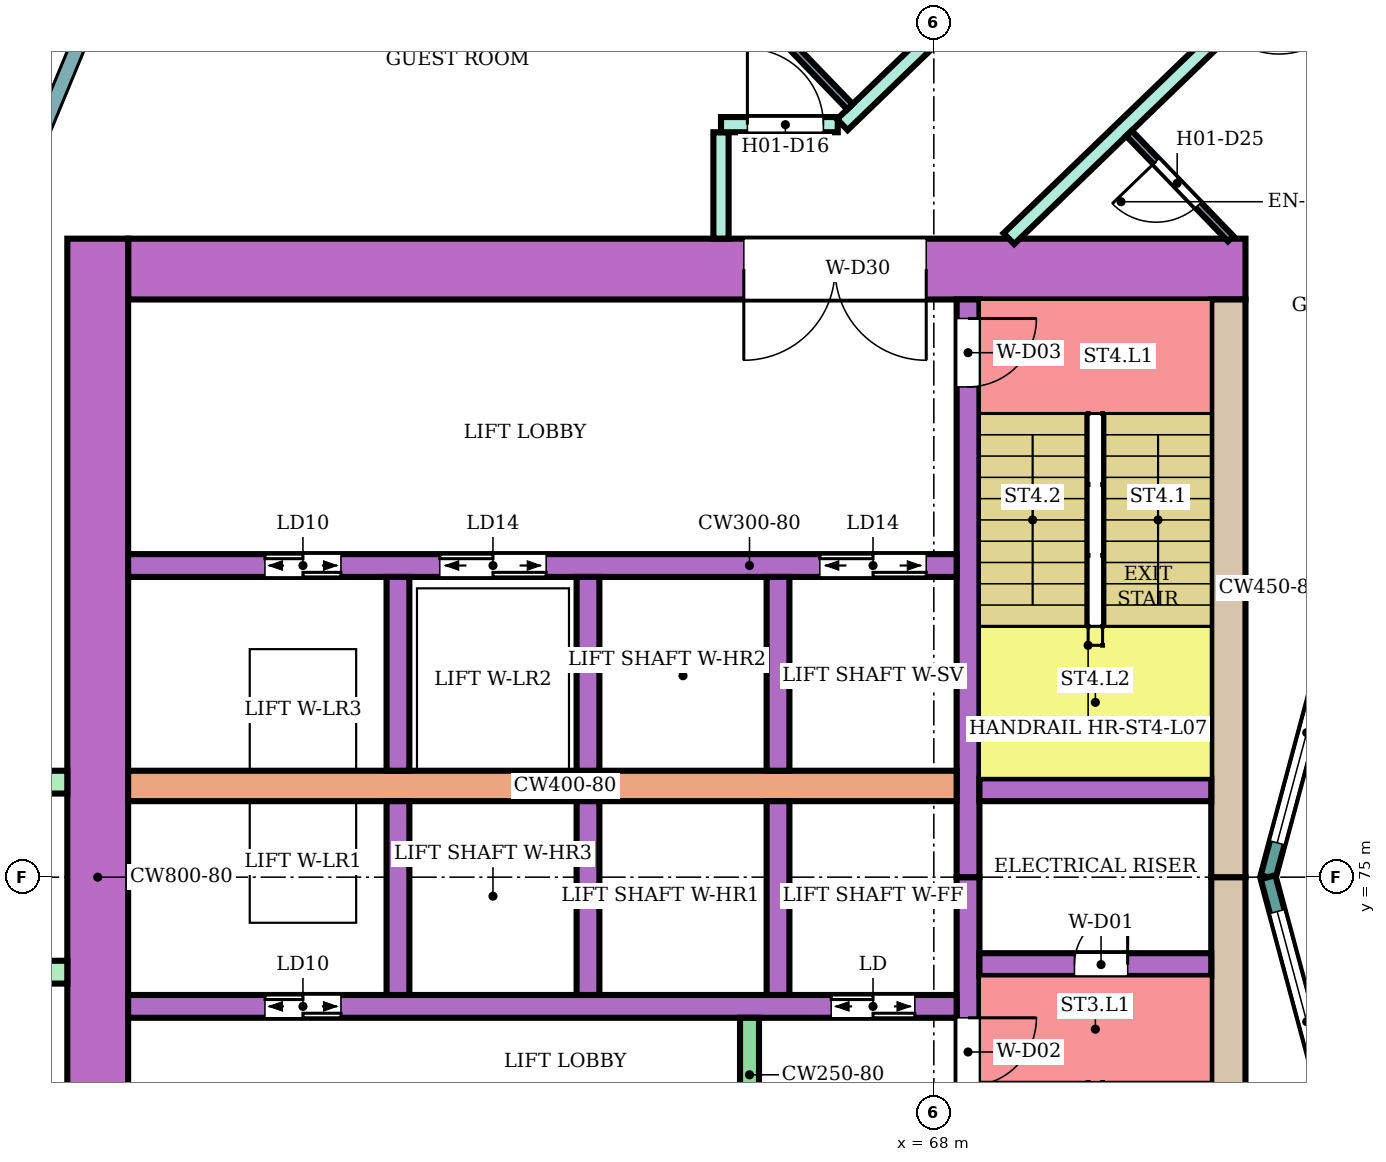
"""IFC4 building model, lengths in metres.
Left out: names, types, materials, properties, quantities, classifications, styles, units other than length and angle.
Written with IfcOpenShell. Run it as: python <this file> out.ifc"""

import sys

from ifc_helpers import new_model, si_unit, direction, frame, frame_2d, origin, place, context, subcontext, project, spatial, rectangle, extrude, element, fill, save


model = new_model("IFC4")
c1 = context("Model", 3, precision=1e-05, world=origin(), true_north=direction((0.0, 1.0)))
c2 = subcontext(c1, "Body", "Model", "MODEL_VIEW")
j1 = project(units=[si_unit("LENGTHUNIT", "METRE"), si_unit("PLANEANGLEUNIT", "RADIAN")], contexts=[c1])
p1 = place(None, origin())
s1 = spatial("IfcSite", under=j1, at=p1, CompositionType="ELEMENT")
p2 = place(p1, origin())
s2 = spatial("IfcBuilding", under=s1, at=p2, CompositionType="ELEMENT")
p3 = place(p2, frame((0.0, 0.0, 36.4)))
s3 = spatial("IfcBuildingStorey", under=s2, at=p3, CompositionType="ELEMENT", Elevation=36.4)
p4 = place(p3, frame((72.1, 83.0, 0.0), z_axis=(0.0, 0.0, 1.0), x_axis=(-1.0, 0.0, 0.0)))
e1 = element("IfcWall", 1, at=p4, inside=s3, PredefinedType="SHEAR", context=c2, shape_type="SweptSolid", body=[
    extrude(rectangle(XDim=14.7, YDim=0.8, at=frame_2d((7.35, 0.0))), origin(), (0.0, 0.0, 1.0), 3.48),
])
p5 = place(p4, frame((4.2, 0.0, 0.0)))
e2 = element("IfcOpeningElement", 2, at=p5, cuts=e1, PredefinedType="OPENING", context=c2, shape_type="SweptSolid", body=[
    extrude(rectangle(XDim=2.4, YDim=2.4, at=frame_2d((1.2, 1.2))), frame((0.0, 0.41, 0.0), z_axis=(0.0, -1.0, 0.0), x_axis=(1.0, 0.0, 0.0)), (0.0, 0.0, 1.0), 0.82),
])
for number, where, z_axis, x_axis in (
    (3, (71.875, 75.0, 0.0), (0.0, 0.0, 1.0), (0.0, -1.0, 0.0)),
    (4, (71.875, 82.6, 0.0), (0.0, 0.0, 1.0), (0.0, -1.0, 0.0)),
):
    element("IfcWall", number, at=place(p3, frame(where, z_axis=z_axis, x_axis=x_axis)), inside=s3, PredefinedType="SHEAR", context=c2, shape_type="SweptSolid", body=[
        extrude(rectangle(XDim=7.6, YDim=0.45, at=frame_2d((3.8, 0.0))), origin(), (0.0, 0.0, 1.0), 3.48),
    ])
p6 = place(p3, frame((57.0, 83.4, 0.0), z_axis=(0.0, 0.0, 1.0), x_axis=(0.0, -1.0, 0.0)))
e5 = element("IfcWall", 5, at=p6, inside=s3, PredefinedType="SHEAR", context=c2, shape_type="SweptSolid", body=[
    extrude(rectangle(XDim=16.8, YDim=0.8, at=frame_2d((8.4, 0.0))), origin(), (0.0, 0.0, 1.0), 3.48),
])
p7 = place(p3, frame((68.45, 75.0, 0.0), z_axis=(0.0, 0.0, 1.0), x_axis=(0.0, -1.0, 0.0)))
e6 = element("IfcWall", 6, at=p7, inside=s3, PredefinedType="SHEAR", context=c2, shape_type="SweptSolid", body=[
    extrude(rectangle(XDim=7.6, YDim=0.3, at=frame_2d((3.8, 0.0))), origin(), (0.0, 0.0, 1.0), 3.48),
])
p8 = place(p7, frame((1.85, 0.0, 0.0)))
e7 = element("IfcOpeningElement", 7, at=p8, cuts=e6, PredefinedType="OPENING", context=c2, shape_type="SweptSolid", body=[
    extrude(rectangle(XDim=0.9, YDim=2.1, at=frame_2d((0.45, 1.05))), frame((0.0, 0.16, 0.0), z_axis=(0.0, -1.0, 0.0), x_axis=(1.0, 0.0, 0.0)), (0.0, 0.0, 1.0), 0.32),
])
p9 = place(p3, frame((68.45, 82.6, 0.0), z_axis=(0.0, 0.0, 1.0), x_axis=(0.0, -1.0, 0.0)))
e8 = element("IfcWall", 8, at=p9, inside=s3, PredefinedType="SHEAR", context=c2, shape_type="SweptSolid", body=[
    extrude(rectangle(XDim=7.6, YDim=0.3, at=frame_2d((3.8, 0.0))), origin(), (0.0, 0.0, 1.0), 3.48),
])
p10 = place(p9, frame((0.25, 0.0, 0.0)))
e9 = element("IfcOpeningElement", 9, at=p10, cuts=e8, PredefinedType="OPENING", context=c2, shape_type="SweptSolid", body=[
    extrude(rectangle(XDim=0.9, YDim=2.1, at=frame_2d((0.45, 1.05))), frame((0.0, 0.16, 0.0), z_axis=(0.0, -1.0, 0.0), x_axis=(1.0, 0.0, 0.0)), (0.0, 0.0, 1.0), 0.32),
])
p11 = place(p3, frame((71.65, 73.85, 0.0), z_axis=(0.0, 0.0, 1.0), x_axis=(-1.0, 0.0, 0.0)))
e10 = element("IfcWall", 10, at=p11, inside=s3, PredefinedType="SHEAR", context=c2, shape_type="SweptSolid", body=[
    extrude(rectangle(XDim=3.05, YDim=0.3, at=frame_2d((1.525, 0.0))), origin(), (0.0, 0.0, 1.0), 3.48),
])
p12 = place(p11, frame((1.1, 0.0, 0.0)))
e11 = element("IfcOpeningElement", 11, at=p12, cuts=e10, PredefinedType="OPENING", context=c2, shape_type="SweptSolid", body=[
    extrude(rectangle(XDim=0.7, YDim=2.0, at=frame_2d((0.35, 1.0))), frame((0.0, 0.16, 0.0), z_axis=(0.0, -1.0, 0.0), x_axis=(1.0, 0.0, 0.0)), (0.0, 0.0, 1.0), 0.32),
])
p13 = place(p3, frame((71.65, 76.15, 0.0), z_axis=(0.0, 0.0, 1.0), x_axis=(-1.0, 0.0, 0.0)))
e12 = element("IfcWall", 12, at=p13, inside=s3, PredefinedType="SHEAR", context=c2, shape_type="SweptSolid", body=[
    extrude(rectangle(XDim=3.05, YDim=0.3, at=frame_2d((1.525, 0.0))), origin(), (0.0, 0.0, 1.0), 3.48),
])
p14 = place(p3, frame((68.3, 73.3, 0.0), z_axis=(0.0, 0.0, 1.0), x_axis=(-1.0, 0.0, 0.0)))
e13 = element("IfcWall", 13, at=p14, inside=s3, PredefinedType="SHEAR", context=c2, shape_type="SweptSolid", body=[
    extrude(rectangle(XDim=10.9, YDim=0.3, at=frame_2d((5.45, 0.0))), origin(), (0.0, 0.0, 1.0), 3.48),
])
p15 = place(p14, frame((0.55, 0.0, 0.0)))
e14 = element("IfcOpeningElement", 14, at=p15, cuts=e13, PredefinedType="OPENING", context=c2, shape_type="SweptSolid", body=[
    extrude(rectangle(XDim=1.1, YDim=2.1, at=frame_2d((0.55, 1.05))), frame((0.0, 0.16, 0.0), z_axis=(0.0, -1.0, 0.0), x_axis=(1.0, 0.0, 0.0)), (0.0, 0.0, 1.0), 0.32),
])
p16 = place(p14, frame((8.1, 0.0, 0.0)))
e15 = element("IfcOpeningElement", 15, at=p16, cuts=e13, PredefinedType="OPENING", context=c2, shape_type="SweptSolid", body=[
    extrude(rectangle(XDim=1.0, YDim=2.1, at=frame_2d((0.5, 1.05))), frame((0.0, 0.16, 0.0), z_axis=(0.0, -1.0, 0.0), x_axis=(1.0, 0.0, 0.0)), (0.0, 0.0, 1.0), 0.32),
])
p17 = place(p3, frame((68.3, 76.2, 0.0), z_axis=(0.0, 0.0, 1.0), x_axis=(-1.0, 0.0, 0.0)))
e16 = element("IfcWall", 16, at=p17, inside=s3, PredefinedType="SHEAR", context=c2, shape_type="SweptSolid", body=[
    extrude(rectangle(XDim=10.9, YDim=0.4, at=frame_2d((5.45, 0.0))), origin(), (0.0, 0.0, 1.0), 3.48),
])
p18 = place(p3, frame((68.3, 79.1, 0.0), z_axis=(0.0, 0.0, 1.0), x_axis=(-1.0, 0.0, 0.0)))
e17 = element("IfcWall", 17, at=p18, inside=s3, PredefinedType="SHEAR", context=c2, shape_type="SweptSolid", body=[
    extrude(rectangle(XDim=10.9, YDim=0.3, at=frame_2d((5.45, 0.0))), origin(), (0.0, 0.0, 1.0), 3.48),
])
p19 = place(p18, frame((0.4, 0.0, 0.0)))
e18 = element("IfcOpeningElement", 18, at=p19, cuts=e17, PredefinedType="OPENING", context=c2, shape_type="SweptSolid", body=[
    extrude(rectangle(XDim=1.4, YDim=2.1, at=frame_2d((0.7, 1.05))), frame((0.0, 0.16, 0.0), z_axis=(0.0, -1.0, 0.0), x_axis=(1.0, 0.0, 0.0)), (0.0, 0.0, 1.0), 0.32),
])
p20 = place(p18, frame((5.4, 0.0, 0.0)))
e19 = element("IfcOpeningElement", 19, at=p20, cuts=e17, PredefinedType="OPENING", context=c2, shape_type="SweptSolid", body=[
    extrude(rectangle(XDim=1.4, YDim=2.1, at=frame_2d((0.7, 1.05))), frame((0.0, 0.16, 0.0), z_axis=(0.0, -1.0, 0.0), x_axis=(1.0, 0.0, 0.0)), (0.0, 0.0, 1.0), 0.32),
])
p21 = place(p18, frame((8.1, 0.0, 0.0)))
e20 = element("IfcOpeningElement", 20, at=p21, cuts=e17, PredefinedType="OPENING", context=c2, shape_type="SweptSolid", body=[
    extrude(rectangle(XDim=1.0, YDim=2.1, at=frame_2d((0.5, 1.05))), frame((0.0, 0.16, 0.0), z_axis=(0.0, -1.0, 0.0), x_axis=(1.0, 0.0, 0.0)), (0.0, 0.0, 1.0), 0.32),
])
for number, where, z_axis, x_axis in (
    (21, (65.95, 76.0, 0.0), (0.0, 0.0, 1.0), (0.0, -1.0, 0.0)),
    (22, (63.45, 76.0, 0.0), (0.0, 0.0, 1.0), (0.0, -1.0, 0.0)),
    (23, (60.95, 76.0, 0.0), (0.0, 0.0, 1.0), (0.0, -1.0, 0.0)),
    (24, (65.95, 78.95, 0.0), (0.0, 0.0, 1.0), (0.0, -1.0, 0.0)),
    (25, (63.45, 78.95, 0.0), (0.0, 0.0, 1.0), (0.0, -1.0, 0.0)),
    (26, (60.95, 78.95, 0.0), (0.0, 0.0, 1.0), (0.0, -1.0, 0.0)),
):
    element("IfcWall", number, at=place(p3, frame(where, z_axis=z_axis, x_axis=x_axis)), inside=s3, PredefinedType="SHEAR", context=c2, shape_type="SweptSolid", body=[
        extrude(rectangle(XDim=2.55, YDim=0.3, at=frame_2d((1.275, 0.0))), origin(), (0.0, 0.0, 1.0), 3.48),
    ])
p22 = place(p3, frame((65.575, 73.15, 0.0), z_axis=(0.0, 0.0, 1.0), x_axis=(0.0, -1.0, 0.0)))
e27 = element("IfcWall", 27, at=p22, inside=s3, PredefinedType="SHEAR", context=c2, shape_type="SweptSolid", body=[
    extrude(rectangle(XDim=1.5, YDim=0.25, at=frame_2d((0.75, 0.0))), origin(), (0.0, 0.0, 1.0), 3.48),
])
for number, where, z_axis, x_axis in (
    (28, (56.6, 76.25, 0.0), (0.0, 0.0, 1.0), (-1.0, 0.0, 0.0)),
    (29, (56.6, 73.75, 0.0), (0.0, 0.0, 1.0), (-1.0, 0.0, 0.0)),
):
    element("IfcWall", number, at=place(p3, frame(where, z_axis=z_axis, x_axis=x_axis)), inside=s3, PredefinedType="NOTDEFINED", context=c2, shape_type="SweptSolid", body=[
        extrude(rectangle(XDim=2.416, YDim=0.3, at=frame_2d((1.208, 0.0))), origin(), (0.0, 0.0, 1.0), 3.8),
    ])
p23 = place(p3, frame((73.415, 78.802, 0.0), z_axis=(0.0, 0.0, 1.0), x_axis=(-0.258789828301, -0.965933654434, 0.0)))
e30 = element("IfcWall", 30, at=p23, inside=s3, PredefinedType="NOTDEFINED", context=c2, shape_type="SweptSolid", body=[
    extrude(rectangle(XDim=3.936, YDim=0.2, at=frame_2d((1.968, 0.0))), origin(), (0.0, 0.0, 1.0), 3.8),
])
p24 = place(p23, frame((0.468, 0.0, 0.9)))
e31 = element("IfcOpeningElement", 31, at=p24, cuts=e30, PredefinedType="OPENING", context=c2, shape_type="SweptSolid", body=[
    extrude(rectangle(XDim=3.0, YDim=2.3, at=frame_2d((1.5, 1.15))), frame((0.0, 0.11, 0.0), z_axis=(0.0, -1.0, 0.0), x_axis=(1.0, 0.0, 0.0)), (0.0, 0.0, 1.0), 0.22),
])
p25 = place(p3, frame((72.396, 75.0, 0.0), z_axis=(0.0, 0.0, 1.0), x_axis=(0.258789828301, -0.965933654434, 0.0)))
e32 = element("IfcWall", 32, at=p25, inside=s3, PredefinedType="NOTDEFINED", context=c2, shape_type="SweptSolid", body=[
    extrude(rectangle(XDim=3.936, YDim=0.2, at=frame_2d((1.968, 0.0))), origin(), (0.0, 0.0, 1.0), 3.8),
])
p26 = place(p25, frame((0.468, 0.0, 0.9)))
e33 = element("IfcOpeningElement", 33, at=p26, cuts=e32, PredefinedType="OPENING", context=c2, shape_type="SweptSolid", body=[
    extrude(rectangle(XDim=3.0, YDim=2.3, at=frame_2d((1.5, 1.15))), frame((0.0, 0.11, 0.0), z_axis=(0.0, -1.0, 0.0), x_axis=(1.0, 0.0, 0.0)), (0.0, 0.0, 1.0), 0.22),
])
p27 = place(p3, frame((65.2, 83.401, 0.0), z_axis=(0.0, 0.0, 1.0), x_axis=(0.0, 1.0, 0.0)))
e34 = element("IfcWall", 34, at=p27, inside=s3, PredefinedType="PARTITIONING", context=c2, shape_type="SweptSolid", body=[
    extrude(rectangle(XDim=1.399, YDim=0.2, at=frame_2d((0.7, 0.0))), origin(), (0.0, 0.0, 1.0), 3.35),
])
p28 = place(p3, frame((65.2, 84.9, 0.0), z_axis=(0.0, 0.0, 1.0), x_axis=(1.0, 0.0, 0.0)))
e35 = element("IfcWall", 35, at=p28, inside=s3, PredefinedType="PARTITIONING", context=c2, shape_type="SweptSolid", body=[
    extrude(rectangle(XDim=1.536, YDim=0.2, at=frame_2d((0.768, 0.0))), origin(), (0.0, 0.0, 1.0), 3.35),
])
p29 = place(p28, frame((0.347, 0.0, 0.0)))
e36 = element("IfcOpeningElement", 36, at=p29, cuts=e35, PredefinedType="OPENING", context=c2, shape_type="SweptSolid", body=[
    extrude(rectangle(XDim=1.0, YDim=2.1, at=frame_2d((0.5, 1.05))), frame((0.0, 0.11, 0.0), z_axis=(0.0, -1.0, 0.0), x_axis=(1.0, 0.0, 0.0)), (0.0, 0.0, 1.0), 0.22),
])
p30 = place(p3, frame((66.796, 84.9, 0.0), z_axis=(0.0, 0.0, 1.0), x_axis=(0.719690131178, 0.694295409092, 0.0)))
e37 = element("IfcWall", 37, at=p30, inside=s3, PredefinedType="PARTITIONING", context=c2, shape_type="SweptSolid", body=[
    extrude(rectangle(XDim=6.585, YDim=0.2, at=frame_2d((3.293, 0.0))), origin(), (0.0, 0.0, 1.0), 3.35),
])
p31 = place(p30, frame((2.867, 0.0, 0.0)))
e38 = element("IfcOpeningElement", 38, at=p31, cuts=e37, PredefinedType="OPENING", context=c2, shape_type="SweptSolid", body=[
    extrude(rectangle(XDim=1.0, YDim=2.1, at=frame_2d((0.5, 1.05))), frame((0.0, 0.11, 0.0), z_axis=(0.0, -1.0, 0.0), x_axis=(1.0, 0.0, 0.0)), (0.0, 0.0, 1.0), 0.22),
])
p32 = place(p3, frame((68.987, 83.4, 0.0), z_axis=(0.0, 0.0, 1.0), x_axis=(0.719591503389, 0.694397629784, 0.0)))
e39 = element("IfcWall", 39, at=p32, inside=s3, PredefinedType="PARTITIONING", context=c2, shape_type="SweptSolid", body=[
    extrude(rectangle(XDim=5.378, YDim=0.2, at=frame_2d((2.689, 0.0))), origin(), (0.0, 0.0, 1.0), 3.35),
])
p33 = place(p32, frame((3.938, 0.0, 0.0)))
e40 = element("IfcOpeningElement", 40, at=p33, cuts=e39, PredefinedType="OPENING", context=c2, shape_type="SweptSolid", body=[
    extrude(rectangle(XDim=1.0, YDim=2.1, at=frame_2d((0.5, 1.05))), frame((0.0, 0.11, 0.0), z_axis=(0.0, -1.0, 0.0), x_axis=(1.0, 0.0, 0.0)), (0.0, 0.0, 1.0), 0.22),
])
p34 = place(p3, frame((72.948, 87.214, 0.0), z_axis=(0.0, 0.0, 1.0), x_axis=(0.499943524694, -0.866058007363, 0.0)))
e41 = element("IfcWall", 41, at=p34, inside=s3, PredefinedType="PARTITIONING", context=c2, shape_type="SweptSolid", body=[
    extrude(rectangle(XDim=6.405, YDim=0.2, at=frame_2d((3.203, 0.0))), origin(), (0.0, 0.0, 1.0), 3.35),
])
p35 = place(p3, frame((65.022, 87.079, 0.0), z_axis=(0.0, 0.0, 1.0), x_axis=(0.694287838235, -0.719697434815, 0.0)))
e42 = element("IfcWall", 42, at=p35, inside=s3, PredefinedType="PARTITIONING", context=c2, shape_type="SweptSolid", body=[
    extrude(rectangle(XDim=2.7, YDim=0.1, at=frame_2d((1.35, 0.0))), origin(), (0.0, 0.0, 1.0), 3.35),
])
p36 = place(p35, frame((0.85, 0.0, 0.0)))
e43 = element("IfcOpeningElement", 43, at=p36, cuts=e42, PredefinedType="OPENING", context=c2, shape_type="SweptSolid", body=[
    extrude(rectangle(XDim=0.8, YDim=2.1, at=frame_2d((0.4, 1.05))), frame((0.0, 0.06, 0.0), z_axis=(0.0, -1.0, 0.0), x_axis=(1.0, 0.0, 0.0)), (0.0, 0.0, 1.0), 0.12),
])
p37 = place(p3, frame((70.567, 84.786, 0.0), z_axis=(0.0, 0.0, 1.0), x_axis=(0.694447472534, -0.719543402368, 0.0)))
e44 = element("IfcWall", 44, at=p37, inside=s3, PredefinedType="PARTITIONING", context=c2, shape_type="SweptSolid", body=[
    extrude(rectangle(XDim=1.926, YDim=0.1, at=frame_2d((0.963, 0.0))), origin(), (0.0, 0.0, 1.0), 3.35),
])
p38 = place(p37, frame((0.513, 0.0, 0.0)))
e45 = element("IfcOpeningElement", 45, at=p38, cuts=e44, PredefinedType="OPENING", context=c2, shape_type="SweptSolid", body=[
    extrude(rectangle(XDim=0.8, YDim=2.1, at=frame_2d((0.4, 1.05))), frame((0.0, 0.06, 0.0), z_axis=(0.0, -1.0, 0.0), x_axis=(1.0, 0.0, 0.0)), (0.0, 0.0, 1.0), 0.12),
])
p39 = place(p24, origin())
e46 = element("IfcWindow", 46, at=p39, inside=s3, PartitioningType="SINGLE_PANEL", PredefinedType="WINDOW", context=c2, shape_type="SweptSolid", body=[
    extrude(rectangle(XDim=3.0, YDim=2.3, at=frame_2d((1.5, 1.15))), frame((0.0, 0.03, 0.0), z_axis=(0.0, -1.0, 0.0), x_axis=(1.0, 0.0, 0.0)), (0.0, 0.0, 1.0), 0.06),
])
fill(e31, e46)
p40 = place(p26, origin())
e47 = element("IfcWindow", 47, at=p40, inside=s3, PartitioningType="SINGLE_PANEL", PredefinedType="WINDOW", context=c2, shape_type="SweptSolid", body=[
    extrude(rectangle(XDim=3.0, YDim=2.3, at=frame_2d((1.5, 1.15))), frame((0.0, 0.03, 0.0), z_axis=(0.0, -1.0, 0.0), x_axis=(1.0, 0.0, 0.0)), (0.0, 0.0, 1.0), 0.06),
])
fill(e33, e47)
p41 = place(p29, origin())
e48 = element("IfcDoor", 48, at=p41, inside=s3, OperationType="SINGLE_SWING_LEFT", PredefinedType="DOOR", context=c2, shape_type="SweptSolid", body=[
    extrude(rectangle(XDim=1.0, YDim=2.1, at=frame_2d((0.5, 1.05))), frame((0.0, 0.025, 0.0), z_axis=(0.0, -1.0, 0.0), x_axis=(1.0, 0.0, 0.0)), (0.0, 0.0, 1.0), 0.05),
])
fill(e36, e48)
p42 = place(p38, frame((0.8, 0.0, 0.0), z_axis=(0.0, 0.0, 1.0), x_axis=(-1.0, 0.0, 0.0)))
e49 = element("IfcDoor", 49, at=p42, inside=s3, OperationType="SINGLE_SWING_RIGHT", PredefinedType="DOOR", context=c2, shape_type="SweptSolid", body=[
    extrude(rectangle(XDim=0.8, YDim=2.1, at=frame_2d((0.4, 1.05))), frame((0.0, 0.025, 0.0), z_axis=(0.0, -1.0, 0.0), x_axis=(1.0, 0.0, 0.0)), (0.0, 0.0, 1.0), 0.05),
])
fill(e45, e49)
p43 = place(p12, frame((0.7, 0.0, 0.0), z_axis=(0.0, 0.0, 1.0), x_axis=(-1.0, 0.0, 0.0)))
e50 = element("IfcDoor", 50, at=p43, inside=s3, OperationType="SINGLE_SWING_RIGHT", PredefinedType="DOOR", context=c2, shape_type="SweptSolid", body=[
    extrude(rectangle(XDim=0.7, YDim=2.0, at=frame_2d((0.35, 1.0))), frame((0.0, 0.025, 0.0), z_axis=(0.0, -1.0, 0.0), x_axis=(1.0, 0.0, 0.0)), (0.0, 0.0, 1.0), 0.05),
])
fill(e11, e50)
p44 = place(p8, origin())
e51 = element("IfcDoor", 51, at=p44, inside=s3, OperationType="SINGLE_SWING_LEFT", PredefinedType="DOOR", context=c2, shape_type="SweptSolid", body=[
    extrude(rectangle(XDim=0.9, YDim=2.1, at=frame_2d((0.45, 1.05))), frame((0.0, 0.025, 0.0), z_axis=(0.0, -1.0, 0.0), x_axis=(1.0, 0.0, 0.0)), (0.0, 0.0, 1.0), 0.05),
])
fill(e7, e51)
p45 = place(p10, origin())
e52 = element("IfcDoor", 52, at=p45, inside=s3, OperationType="SINGLE_SWING_LEFT", PredefinedType="DOOR", context=c2, shape_type="SweptSolid", body=[
    extrude(rectangle(XDim=0.9, YDim=2.1, at=frame_2d((0.45, 1.05))), frame((0.0, 0.025, 0.0), z_axis=(0.0, -1.0, 0.0), x_axis=(1.0, 0.0, 0.0)), (0.0, 0.0, 1.0), 0.05),
])
fill(e9, e52)
p46 = place(p15, origin())
e53 = element("IfcDoor", 53, at=p46, inside=s3, OperationType="DOUBLE_DOOR_SLIDING", PredefinedType="DOOR", context=c2, shape_type="SweptSolid", body=[
    extrude(rectangle(XDim=1.1, YDim=2.1, at=frame_2d((0.55, 1.05))), frame((0.0, 0.025, 0.0), z_axis=(0.0, -1.0, 0.0), x_axis=(1.0, 0.0, 0.0)), (0.0, 0.0, 1.0), 0.05),
])
fill(e14, e53)
p47 = place(p16, origin())
e54 = element("IfcDoor", 54, at=p47, inside=s3, OperationType="DOUBLE_DOOR_SLIDING", PredefinedType="DOOR", context=c2, shape_type="SweptSolid", body=[
    extrude(rectangle(XDim=1.0, YDim=2.1, at=frame_2d((0.5, 1.05))), frame((0.0, 0.025, 0.0), z_axis=(0.0, -1.0, 0.0), x_axis=(1.0, 0.0, 0.0)), (0.0, 0.0, 1.0), 0.05),
])
fill(e15, e54)
p48 = place(p19, origin())
e55 = element("IfcDoor", 55, at=p48, inside=s3, OperationType="DOUBLE_DOOR_SLIDING", PredefinedType="DOOR", context=c2, shape_type="SweptSolid", body=[
    extrude(rectangle(XDim=1.4, YDim=2.1, at=frame_2d((0.7, 1.05))), frame((0.0, 0.025, 0.0), z_axis=(0.0, -1.0, 0.0), x_axis=(1.0, 0.0, 0.0)), (0.0, 0.0, 1.0), 0.05),
])
fill(e18, e55)
p49 = place(p20, origin())
e56 = element("IfcDoor", 56, at=p49, inside=s3, OperationType="DOUBLE_DOOR_SLIDING", PredefinedType="DOOR", context=c2, shape_type="SweptSolid", body=[
    extrude(rectangle(XDim=1.4, YDim=2.1, at=frame_2d((0.7, 1.05))), frame((0.0, 0.025, 0.0), z_axis=(0.0, -1.0, 0.0), x_axis=(1.0, 0.0, 0.0)), (0.0, 0.0, 1.0), 0.05),
])
fill(e19, e56)
p50 = place(p21, origin())
e57 = element("IfcDoor", 57, at=p50, inside=s3, OperationType="DOUBLE_DOOR_SLIDING", PredefinedType="DOOR", context=c2, shape_type="SweptSolid", body=[
    extrude(rectangle(XDim=1.0, YDim=2.1, at=frame_2d((0.5, 1.05))), frame((0.0, 0.025, 0.0), z_axis=(0.0, -1.0, 0.0), x_axis=(1.0, 0.0, 0.0)), (0.0, 0.0, 1.0), 0.05),
])
fill(e20, e57)
p51 = place(p5, origin())
e58 = element("IfcDoor", 58, at=p51, inside=s3, OperationType="DOUBLE_DOOR_SINGLE_SWING", PredefinedType="DOOR", context=c2, shape_type="SweptSolid", body=[
    extrude(rectangle(XDim=2.4, YDim=2.4, at=frame_2d((1.2, 1.2))), frame((0.0, 0.025, 0.0), z_axis=(0.0, -1.0, 0.0), x_axis=(1.0, 0.0, 0.0)), (0.0, 0.0, 1.0), 0.05),
])
fill(e2, e58)
save(model, sys.argv[1])
